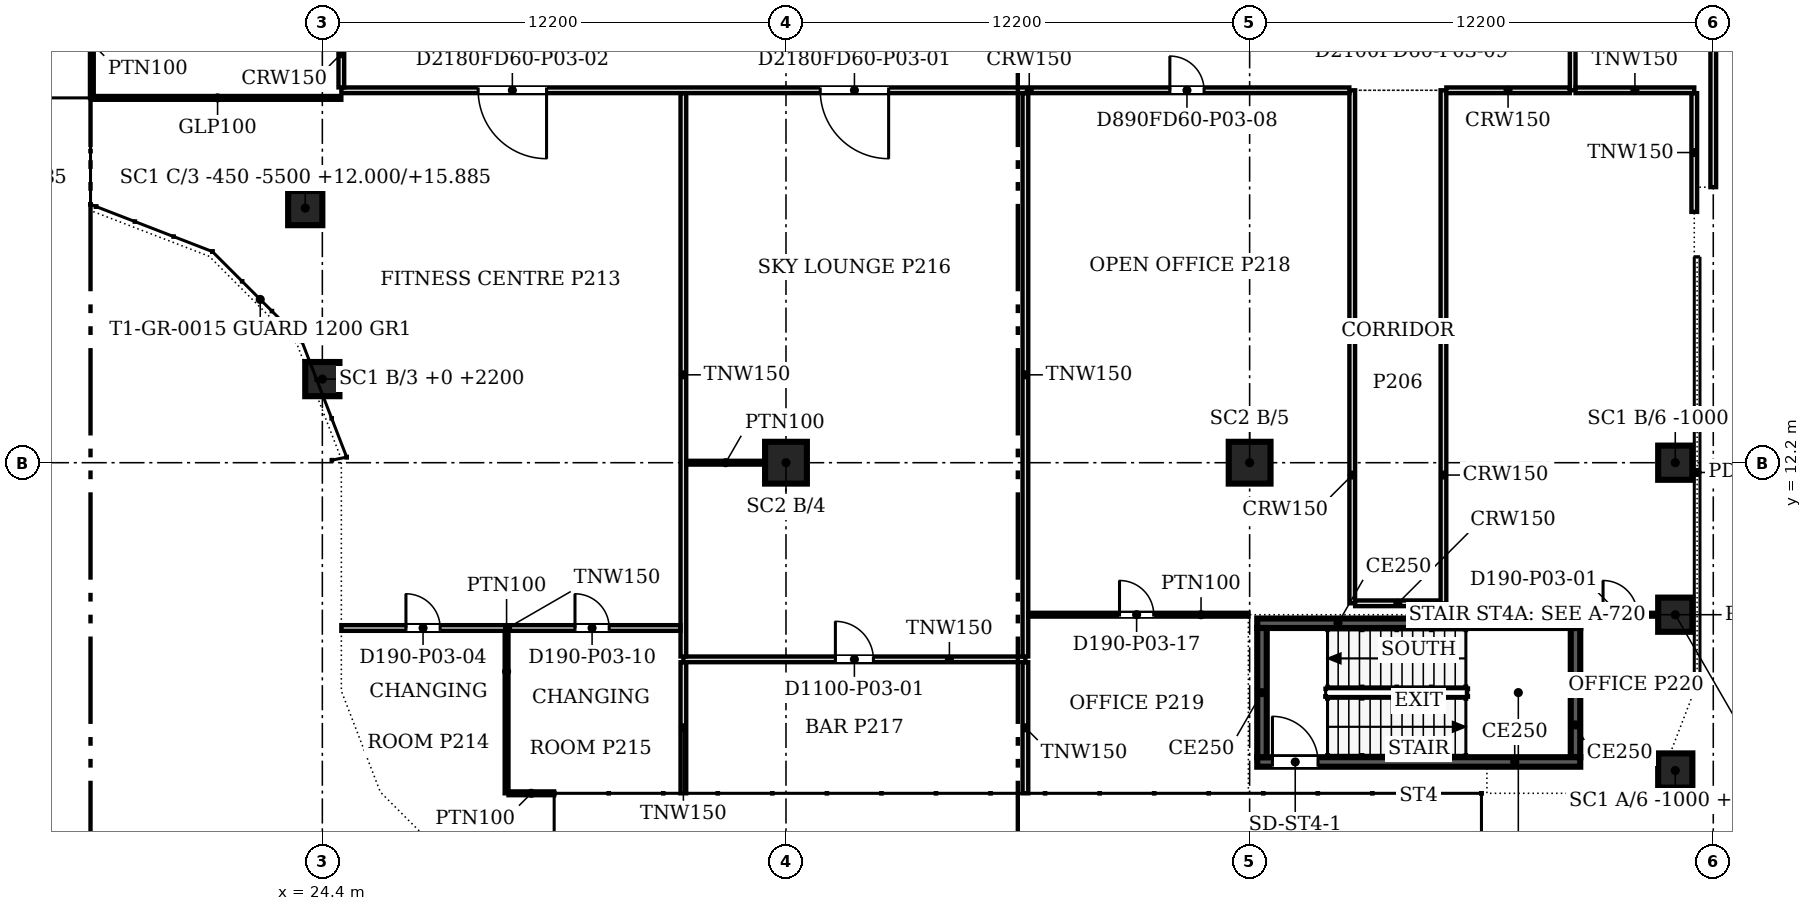
"""IFC4 building model, lengths in metres.
Left out: names, types, materials, properties, quantities, classifications, styles, units other than length and angle.
Written with IfcOpenShell. Run it as: python <this file> out.ifc"""

import sys

from ifc_helpers import new_model, si_unit, direction, frame, frame_2d, origin, origin_2d, place, context, subcontext, project, spatial, rectangle, extrude, source, transform, mapped, element, fill, save


model = new_model("IFC4")
c1 = context("Model", 3, precision=1e-05, world=origin(), true_north=direction((0.0, 1.0)))
c2 = subcontext(c1, "Body", "Model", "MODEL_VIEW")
j1 = project(units=[si_unit("LENGTHUNIT", "METRE"), si_unit("PLANEANGLEUNIT", "RADIAN")], contexts=[c1])
p1 = place(None, origin())
s1 = spatial("IfcSite", under=j1, at=p1, CompositionType="ELEMENT")
p2 = place(p1, origin())
s2 = spatial("IfcBuilding", under=s1, at=p2, CompositionType="ELEMENT")
p3 = place(p2, frame((0.0, 0.0, 12.0)))
s3 = spatial("IfcBuildingStorey", under=s2, at=p3, CompositionType="ELEMENT", Elevation=12.0)
for number, where, z_axis, x_axis in (
    (1, (36.6, 12.2, 0.0), (0.0, 0.0, 1.0), (1.0, 0.0, 0.0)),
    (2, (48.8, 12.2, 0.0), (0.0, 0.0, 1.0), (1.0, 0.0, 0.0)),
):
    element("IfcColumn", number, at=place(p3, frame(where, z_axis=z_axis, x_axis=x_axis)), inside=s3, PredefinedType="COLUMN", context=c2, shape_type="SweptSolid", body=[
        extrude(rectangle(XDim=1.1, YDim=1.1, at=origin_2d()), origin(), (0.0, 0.0, 1.0), 4.6),
    ])
for number, where, z_axis, x_axis in (
    (3, (61.0, 19.0, 0.0), (0.0, 0.0, 1.0), (1.0, 0.0, 0.0)),
    (4, (60.0, 12.2, 0.0), (0.0, 0.0, 1.0), (1.0, 0.0, 0.0)),
    (5, (24.4, 14.4, 0.0), (0.0, 0.0, 1.0), (1.0, 0.0, 0.0)),
    (6, (60.0, 8.2, 0.0), (0.0, 0.0, 1.0), (1.0, 0.0, 0.0)),
    (7, (60.0, 4.1, 0.0), (0.0, 0.0, 1.0), (1.0, 0.0, 0.0)),
    (8, (61.0, 18.1, 0.0), (0.0, 0.0, 1.0), (1.0, 0.0, 0.0)),
):
    element("IfcColumn", number, at=place(p3, frame(where, z_axis=z_axis, x_axis=x_axis)), inside=s3, PredefinedType="COLUMN", context=c2, shape_type="SweptSolid", body=[
        extrude(rectangle(XDim=0.9, YDim=0.9, at=origin_2d()), origin(), (0.0, 0.0, 1.0), 4.6),
    ])
p4 = place(p3, frame((23.95, 18.9, 0.0), z_axis=(0.0, 0.0, 1.0), x_axis=(1.0, 0.0, 0.0)))
e9 = element("IfcColumn", 9, at=p4, inside=s3, PredefinedType="COLUMN", context=c2, shape_type="SweptSolid", body=[
    extrude(rectangle(XDim=0.9, YDim=0.9, at=origin_2d()), origin(), (0.0, 0.0, 1.0), 3.885),
])
p5 = place(p3, frame((57.5, 4.325, 0.0), z_axis=(0.0, 0.0, 1.0), x_axis=(-1.0, 0.0, 0.0)))
e10 = element("IfcWall", 10, at=p5, inside=s3, PredefinedType="SOLIDWALL", context=c2, shape_type="SweptSolid", body=[
    extrude(rectangle(XDim=8.5, YDim=0.25, at=frame_2d((4.25, 0.0))), origin(), (0.0, 0.0, 1.0), 4.8),
])
m1 = source(origin(), c2, "Body", "SweptSolid", [
    extrude(rectangle(XDim=1.2, YDim=2.1, at=frame_2d((0.6, 1.05))), frame((0.0, 0.135, 0.0), z_axis=(0.0, -1.0, 0.0), x_axis=(1.0, 0.0, 0.0)), (0.0, 0.0, 1.0), 0.27),
])
p6 = place(p5, frame((6.9, 0.0, 0.0)))
e11 = element("IfcOpeningElement", 11, at=p6, cuts=e10, PredefinedType="OPENING", context=c2, shape_type="MappedRepresentation", body=[
    mapped(m1, transform((0.0, 0.0, 0.0), scale=1.0)),
])
p7 = place(p3, frame((49.125, 4.45, 0.0), z_axis=(0.0, 0.0, 1.0), x_axis=(0.0, 1.0, 0.0)))
e12 = element("IfcWall", 12, at=p7, inside=s3, PredefinedType="SOLIDWALL", context=c2, shape_type="SweptSolid", body=[
    extrude(rectangle(XDim=3.4, YDim=0.25, at=frame_2d((1.7, 0.0))), origin(), (0.0, 0.0, 1.0), 4.8),
])
p8 = place(p3, frame((49.0, 7.975, 0.0), z_axis=(0.0, 0.0, 1.0), x_axis=(1.0, 0.0, 0.0)))
e13 = element("IfcWall", 13, at=p8, inside=s3, PredefinedType="SOLIDWALL", context=c2, shape_type="SweptSolid", body=[
    extrude(rectangle(XDim=8.5, YDim=0.25, at=frame_2d((4.25, 0.0))), origin(), (0.0, 0.0, 1.0), 4.8),
])
p9 = place(p3, frame((57.375, 7.85, 0.0), z_axis=(0.0, 0.0, 1.0), x_axis=(0.0, -1.0, 0.0)))
e14 = element("IfcWall", 14, at=p9, inside=s3, PredefinedType="SOLIDWALL", context=c2, shape_type="SweptSolid", body=[
    extrude(rectangle(XDim=3.4, YDim=0.25, at=frame_2d((1.7, 0.0))), origin(), (0.0, 0.0, 1.0), 4.8),
])
p10 = place(p3, frame((29.248, 3.5, 0.0), z_axis=(0.0, 0.0, 1.0), x_axis=(0.0, 1.0, 0.0)))
e15 = element("IfcWall", 15, at=p10, inside=s3, PredefinedType="PARTITIONING", context=c2, shape_type="SweptSolid", body=[
    extrude(rectangle(XDim=4.274, YDim=0.1, at=frame_2d((2.137, 0.0))), origin(), (0.0, 0.0, 1.0), 3.672),
])
p11 = place(p3, frame((29.299, 3.5, 0.0), z_axis=(0.0, 0.0, 1.0), x_axis=(1.0, 0.0, 0.0)))
e16 = element("IfcWall", 16, at=p11, inside=s3, PredefinedType="PARTITIONING", context=c2, shape_type="SweptSolid", body=[
    extrude(rectangle(XDim=1.201, YDim=0.1, at=frame_2d((0.601, 0.0))), origin(), (0.0, 0.0, 1.0), 3.672),
])
for number, where, z_axis, x_axis in (
    (17, (33.9, 3.5, 0.0), (0.0, 0.0, 1.0), (0.0, 1.0, 0.0)),
    (18, (42.9, 3.5, 0.0), (0.0, 0.0, 1.0), (0.0, 1.0, 0.0)),
):
    element("IfcWall", number, at=place(p3, frame(where, z_axis=z_axis, x_axis=x_axis)), inside=s3, PredefinedType="PARTITIONING", context=c2, shape_type="SweptSolid", body=[
        extrude(rectangle(XDim=3.449, YDim=0.15, at=frame_2d((1.725, 0.0))), origin(), (0.0, 0.0, 1.0), 3.672),
    ])
p12 = place(p3, frame((42.9, 7.025, 0.0), z_axis=(0.0, 0.0, 1.0), x_axis=(-1.0, 0.0, 0.0)))
e19 = element("IfcWall", 19, at=p12, inside=s3, PredefinedType="PARTITIONING", context=c2, shape_type="SweptSolid", body=[
    extrude(rectangle(XDim=9.0, YDim=0.15, at=frame_2d((4.5, 0.0))), origin(), (0.0, 0.0, 1.0), 3.672),
])
m2 = source(origin(), c2, "Body", "SweptSolid", [
    extrude(rectangle(XDim=1.0, YDim=2.1, at=frame_2d((0.5, 1.05))), frame((0.0, 0.085, 0.0), z_axis=(0.0, -1.0, 0.0), x_axis=(1.0, 0.0, 0.0)), (0.0, 0.0, 1.0), 0.17),
])
p13 = place(p12, frame((4.0, 0.0, 0.0)))
e20 = element("IfcOpeningElement", 20, at=p13, cuts=e19, PredefinedType="OPENING", context=c2, shape_type="MappedRepresentation", body=[
    mapped(m2, transform((0.0, 0.0, 0.0), scale=1.0)),
])
for number, where, z_axis, x_axis in (
    (21, (33.9, 7.101, 0.0), (0.0, 0.0, 1.0), (0.0, 1.0, 0.0)),
    (22, (42.9, 7.101, 0.0), (0.0, 0.0, 1.0), (0.0, 1.0, 0.0)),
):
    element("IfcWall", number, at=place(p3, frame(where, z_axis=z_axis, x_axis=x_axis)), inside=s3, PredefinedType="PARTITIONING", context=c2, shape_type="SweptSolid", body=[
        extrude(rectangle(XDim=14.823, YDim=0.15, at=frame_2d((7.412, 0.0))), origin(), (0.0, 0.0, 1.0), 3.672),
    ])
p14 = place(p3, frame((33.824, 7.85, 0.0), z_axis=(0.0, 0.0, 1.0), x_axis=(-1.0, 0.0, 0.0)))
e23 = element("IfcWall", 23, at=p14, inside=s3, PredefinedType="PARTITIONING", context=c2, shape_type="SweptSolid", body=[
    extrude(rectangle(XDim=8.924, YDim=0.15, at=frame_2d((4.462, 0.0))), origin(), (0.0, 0.0, 1.0), 3.672),
])
m3 = source(origin(), c2, "Body", "SweptSolid", [
    extrude(rectangle(XDim=0.9, YDim=2.1, at=frame_2d((0.45, 1.05))), frame((0.0, 0.085, 0.0), z_axis=(0.0, -1.0, 0.0), x_axis=(1.0, 0.0, 0.0)), (0.0, 0.0, 1.0), 0.17),
])
p15 = place(p14, frame((6.324, 0.0, 0.0)))
e24 = element("IfcOpeningElement", 24, at=p15, cuts=e23, PredefinedType="OPENING", context=c2, shape_type="MappedRepresentation", body=[
    mapped(m3, transform((0.0, 0.0, 0.0), scale=1.0)),
])
p16 = place(p14, frame((1.876, 0.0, 0.0)))
e25 = element("IfcOpeningElement", 25, at=p16, cuts=e23, PredefinedType="OPENING", context=c2, shape_type="MappedRepresentation", body=[
    mapped(m3, transform((0.0, 0.0, 0.0), scale=1.0)),
])
p17 = place(p3, frame((48.767, 8.2, 0.0), z_axis=(0.0, 0.0, 1.0), x_axis=(-1.0, 0.0, 0.0)))
e26 = element("IfcWall", 26, at=p17, inside=s3, PredefinedType="PARTITIONING", context=c2, shape_type="SweptSolid", body=[
    extrude(rectangle(XDim=5.791, YDim=0.1, at=frame_2d((2.895, 0.0))), origin(), (0.0, 0.0, 1.0), 3.672),
])
m4 = source(origin(), c2, "Body", "SweptSolid", [
    extrude(rectangle(XDim=0.9, YDim=2.1, at=frame_2d((0.45, 1.05))), frame((0.0, 0.06, 0.0), z_axis=(0.0, -1.0, 0.0), x_axis=(1.0, 0.0, 0.0)), (0.0, 0.0, 1.0), 0.12),
])
p18 = place(p17, frame((2.491, 0.0, 0.0)))
e27 = element("IfcOpeningElement", 27, at=p18, cuts=e26, PredefinedType="OPENING", context=c2, shape_type="MappedRepresentation", body=[
    mapped(m4, transform((0.0, 0.0, 0.0), scale=1.0)),
])
p19 = place(p3, frame((59.549, 8.2, 0.0), z_axis=(0.0, 0.0, 1.0), x_axis=(-1.0, 0.0, 0.0)))
e28 = element("IfcWall", 28, at=p19, inside=s3, PredefinedType="PARTITIONING", context=c2, shape_type="SweptSolid", body=[
    extrude(rectangle(XDim=2.049, YDim=0.1, at=frame_2d((1.024, 0.0))), origin(), (0.0, 0.0, 1.0), 3.672),
])
p20 = place(p19, frame((0.549, 0.0, 0.0)))
e29 = element("IfcOpeningElement", 29, at=p20, cuts=e28, PredefinedType="OPENING", context=c2, shape_type="MappedRepresentation", body=[
    mapped(m4, transform((0.0, 0.0, 0.0), scale=1.0)),
])
p21 = place(p3, frame((51.5, 8.5, 0.0), z_axis=(0.0, 0.0, 1.0), x_axis=(0.0, 1.0, 0.0)))
e30 = element("IfcWall", 30, at=p21, inside=s3, PredefinedType="PARTITIONING", context=c2, shape_type="SweptSolid", body=[
    extrude(rectangle(XDim=13.5, YDim=0.15, at=frame_2d((6.75, 0.0))), origin(), (0.0, 0.0, 1.0), 3.672),
])
p22 = place(p3, frame((51.576, 8.5, 0.0), z_axis=(0.0, 0.0, 1.0), x_axis=(1.0, 0.0, 0.0)))
e31 = element("IfcWall", 31, at=p22, inside=s3, PredefinedType="PARTITIONING", context=c2, shape_type="SweptSolid", body=[
    extrude(rectangle(XDim=2.248, YDim=0.15, at=frame_2d((1.124, 0.0))), origin(), (0.0, 0.0, 1.0), 3.672),
])
p23 = place(p3, frame((53.9, 8.5, 0.0), z_axis=(0.0, 0.0, 1.0), x_axis=(0.0, 1.0, 0.0)))
e32 = element("IfcWall", 32, at=p23, inside=s3, PredefinedType="PARTITIONING", context=c2, shape_type="SweptSolid", body=[
    extrude(rectangle(XDim=13.5, YDim=0.15, at=frame_2d((6.75, 0.0))), origin(), (0.0, 0.0, 1.0), 3.672),
])
p24 = place(p3, frame((36.05, 12.2, 0.0), z_axis=(0.0, 0.0, 1.0), x_axis=(-1.0, 0.0, 0.0)))
e33 = element("IfcWall", 33, at=p24, inside=s3, PredefinedType="PARTITIONING", context=c2, shape_type="SweptSolid", body=[
    extrude(rectangle(XDim=2.075, YDim=0.1, at=frame_2d((1.038, 0.0))), origin(), (0.0, 0.0, 1.0), 3.672),
])
p25 = place(p3, frame((60.5, 18.8, 0.0), z_axis=(0.0, 0.0, 1.0), x_axis=(0.0, 1.0, 0.0)))
e34 = element("IfcWall", 34, at=p25, inside=s3, PredefinedType="PARTITIONING", context=c2, shape_type="SweptSolid", body=[
    extrude(rectangle(XDim=3.124, YDim=0.15, at=frame_2d((1.562, 0.0))), origin(), (0.0, 0.0, 1.0), 3.672),
])
p26 = place(p3, frame((61.0, 19.451, 0.0), z_axis=(0.0, 0.0, 1.0), x_axis=(0.0, 1.0, 0.0)))
e35 = element("IfcWall", 35, at=p26, inside=s3, PredefinedType="PARTITIONING", context=c2, shape_type="SweptSolid", body=[
    extrude(rectangle(XDim=7.548, YDim=0.15, at=frame_2d((3.774, 0.0))), origin(), (0.0, 0.0, 1.0), 3.672),
])
p27 = place(p3, frame((18.335, 21.8, 0.0), z_axis=(0.0, 0.0, 1.0), x_axis=(0.0, 1.0, 0.0)))
e36 = element("IfcWall", 36, at=p27, inside=s3, PredefinedType="PARTITIONING", context=c2, shape_type="SweptSolid", body=[
    extrude(rectangle(XDim=5.725, YDim=0.1, at=frame_2d((2.862, 0.0))), origin(), (0.0, 0.0, 1.0), 3.672),
])
p28 = place(p3, frame((18.386, 21.8, 0.0), z_axis=(0.0, 0.0, 1.0), x_axis=(1.0, 0.0, 0.0)))
e37 = element("IfcWall", 37, at=p28, inside=s3, PredefinedType="PARTITIONING", context=c2, shape_type="SweptSolid", body=[
    extrude(rectangle(XDim=6.514, YDim=0.1, at=frame_2d((3.257, 0.0))), origin(), (0.0, 0.0, 1.0), 3.672),
])
p29 = place(p3, frame((51.424, 22.0, 0.0), z_axis=(0.0, 0.0, 1.0), x_axis=(-1.0, 0.0, 0.0)))
e38 = element("IfcWall", 38, at=p29, inside=s3, PredefinedType="PARTITIONING", context=c2, shape_type="SweptSolid", body=[
    extrude(rectangle(XDim=26.524, YDim=0.15, at=frame_2d((13.262, 0.0))), origin(), (0.0, 0.0, 1.0), 3.672),
])
m5 = source(origin(), c2, "Body", "SweptSolid", [
    extrude(rectangle(XDim=1.8, YDim=2.1, at=frame_2d((0.9, 1.05))), frame((0.0, 0.085, 0.0), z_axis=(0.0, -1.0, 0.0), x_axis=(1.0, 0.0, 0.0)), (0.0, 0.0, 1.0), 0.17),
])
p30 = place(p29, frame((12.123, 0.0, 0.0)))
e39 = element("IfcOpeningElement", 39, at=p30, cuts=e38, PredefinedType="OPENING", context=c2, shape_type="MappedRepresentation", body=[
    mapped(m5, transform((0.0, 0.0, 0.0), scale=1.0)),
])
p31 = place(p29, frame((21.124, 0.0, 0.0)))
e40 = element("IfcOpeningElement", 40, at=p31, cuts=e38, PredefinedType="OPENING", context=c2, shape_type="MappedRepresentation", body=[
    mapped(m5, transform((0.0, 0.0, 0.0), scale=1.0)),
])
p32 = place(p29, frame((3.823, 0.0, 0.0)))
e41 = element("IfcOpeningElement", 41, at=p32, cuts=e38, PredefinedType="OPENING", context=c2, shape_type="MappedRepresentation", body=[
    mapped(m3, transform((0.0, 0.0, 0.0), scale=1.0)),
])
p33 = place(p3, frame((53.976, 22.0, 0.0), z_axis=(0.0, 0.0, 1.0), x_axis=(1.0, 0.0, 0.0)))
e42 = element("IfcWall", 42, at=p33, inside=s3, PredefinedType="PARTITIONING", context=c2, shape_type="SweptSolid", body=[
    extrude(rectangle(XDim=3.248, YDim=0.15, at=frame_2d((1.624, 0.0))), origin(), (0.0, 0.0, 1.0), 3.672),
])
p34 = place(p3, frame((57.3, 30.6, 0.0), z_axis=(0.0, 0.0, 1.0), x_axis=(0.0, -1.0, 0.0)))
e43 = element("IfcWall", 43, at=p34, inside=s3, PredefinedType="PARTITIONING", context=c2, shape_type="SweptSolid", body=[
    extrude(rectangle(XDim=8.6, YDim=0.15, at=frame_2d((4.3, 0.0))), origin(), (0.0, 0.0, 1.0), 3.672),
])
p35 = place(p34, frame((3.8, 0.0, 0.0)))
e44 = element("IfcOpeningElement", 44, at=p35, cuts=e43, PredefinedType="OPENING", context=c2, shape_type="MappedRepresentation", body=[
    mapped(m2, transform((0.0, 0.0, 0.0), scale=1.0)),
])
p36 = place(p3, frame((57.376, 22.0, 0.0), z_axis=(0.0, 0.0, 1.0), x_axis=(1.0, 0.0, 0.0)))
e45 = element("IfcWall", 45, at=p36, inside=s3, PredefinedType="PARTITIONING", context=c2, shape_type="SweptSolid", body=[
    extrude(rectangle(XDim=3.124, YDim=0.15, at=frame_2d((1.562, 0.0))), origin(), (0.0, 0.0, 1.0), 3.672),
])
p37 = place(p3, frame((24.9, 22.076, 0.0), z_axis=(0.0, 0.0, 1.0), x_axis=(0.0, 1.0, 0.0)))
e46 = element("IfcWall", 46, at=p37, inside=s3, PredefinedType="PARTITIONING", context=c2, shape_type="SweptSolid", body=[
    extrude(rectangle(XDim=1.773, YDim=0.15, at=frame_2d((0.887, 0.0))), origin(), (0.0, 0.0, 1.0), 3.672),
])
m6 = source(origin(), c2, "Body", "SweptSolid", [
    extrude(rectangle(XDim=1.2, YDim=2.1, at=frame_2d((0.6, 1.05))), frame((0.0, 0.025, 0.0), z_axis=(0.0, -1.0, 0.0), x_axis=(1.0, 0.0, 0.0)), (0.0, 0.0, 1.0), 0.05),
])
p38 = place(p6, origin())
e47 = element("IfcDoor", 47, at=p38, inside=s3, OperationType="SINGLE_SWING_RIGHT", PredefinedType="DOOR", context=c2, shape_type="MappedRepresentation", body=[
    mapped(m6, transform((0.0, 0.0, 0.0), scale=1.0)),
])
fill(e11, e47)
m7 = source(origin(), c2, "Body", "SweptSolid", [
    extrude(rectangle(XDim=0.9, YDim=2.1, at=frame_2d((0.45, 1.05))), frame((0.0, 0.025, 0.0), z_axis=(0.0, -1.0, 0.0), x_axis=(1.0, 0.0, 0.0)), (0.0, 0.0, 1.0), 0.05),
])
p39 = place(p20, origin())
e48 = element("IfcDoor", 48, at=p39, inside=s3, OperationType="SINGLE_SWING_RIGHT", PredefinedType="DOOR", context=c2, shape_type="MappedRepresentation", body=[
    mapped(m7, transform((0.0, 0.0, 0.0), scale=1.0)),
])
fill(e29, e48)
p40 = place(p15, origin())
e49 = element("IfcDoor", 49, at=p40, inside=s3, OperationType="SINGLE_SWING_RIGHT", PredefinedType="DOOR", context=c2, shape_type="MappedRepresentation", body=[
    mapped(m7, transform((0.0, 0.0, 0.0), scale=1.0)),
])
fill(e24, e49)
p41 = place(p16, origin())
e50 = element("IfcDoor", 50, at=p41, inside=s3, OperationType="SINGLE_SWING_RIGHT", PredefinedType="DOOR", context=c2, shape_type="MappedRepresentation", body=[
    mapped(m7, transform((0.0, 0.0, 0.0), scale=1.0)),
])
fill(e25, e50)
p42 = place(p18, origin())
e51 = element("IfcDoor", 51, at=p42, inside=s3, OperationType="SINGLE_SWING_RIGHT", PredefinedType="DOOR", context=c2, shape_type="MappedRepresentation", body=[
    mapped(m7, transform((0.0, 0.0, 0.0), scale=1.0)),
])
fill(e27, e51)
m8 = source(origin(), c2, "Body", "SweptSolid", [
    extrude(rectangle(XDim=1.8, YDim=2.1, at=frame_2d((0.9, 1.05))), frame((0.0, 0.025, 0.0), z_axis=(0.0, -1.0, 0.0), x_axis=(1.0, 0.0, 0.0)), (0.0, 0.0, 1.0), 0.05),
])
p43 = place(p30, origin())
e52 = element("IfcDoor", 52, at=p43, inside=s3, OperationType="DOUBLE_DOOR_SINGLE_SWING", PredefinedType="DOOR", context=c2, shape_type="MappedRepresentation", body=[
    mapped(m8, transform((0.0, 0.0, 0.0), scale=1.0)),
])
fill(e39, e52)
p44 = place(p31, origin())
e53 = element("IfcDoor", 53, at=p44, inside=s3, OperationType="DOUBLE_DOOR_SINGLE_SWING", PredefinedType="DOOR", context=c2, shape_type="MappedRepresentation", body=[
    mapped(m8, transform((0.0, 0.0, 0.0), scale=1.0)),
])
fill(e40, e53)
m9 = source(origin(), c2, "Body", "SweptSolid", [
    extrude(rectangle(XDim=1.0, YDim=2.1, at=frame_2d((0.5, 1.05))), frame((0.0, 0.025, 0.0), z_axis=(0.0, -1.0, 0.0), x_axis=(1.0, 0.0, 0.0)), (0.0, 0.0, 1.0), 0.05),
])
p45 = place(p13, origin())
e54 = element("IfcDoor", 54, at=p45, inside=s3, OperationType="SINGLE_SWING_RIGHT", PredefinedType="DOOR", context=c2, shape_type="MappedRepresentation", body=[
    mapped(m9, transform((0.0, 0.0, 0.0), scale=1.0)),
])
fill(e20, e54)
p46 = place(p32, origin())
e55 = element("IfcDoor", 55, at=p46, inside=s3, OperationType="SINGLE_SWING_RIGHT", PredefinedType="DOOR", context=c2, shape_type="MappedRepresentation", body=[
    mapped(m7, transform((0.0, 0.0, 0.0), scale=1.0)),
])
fill(e41, e55)
save(model, sys.argv[1])
